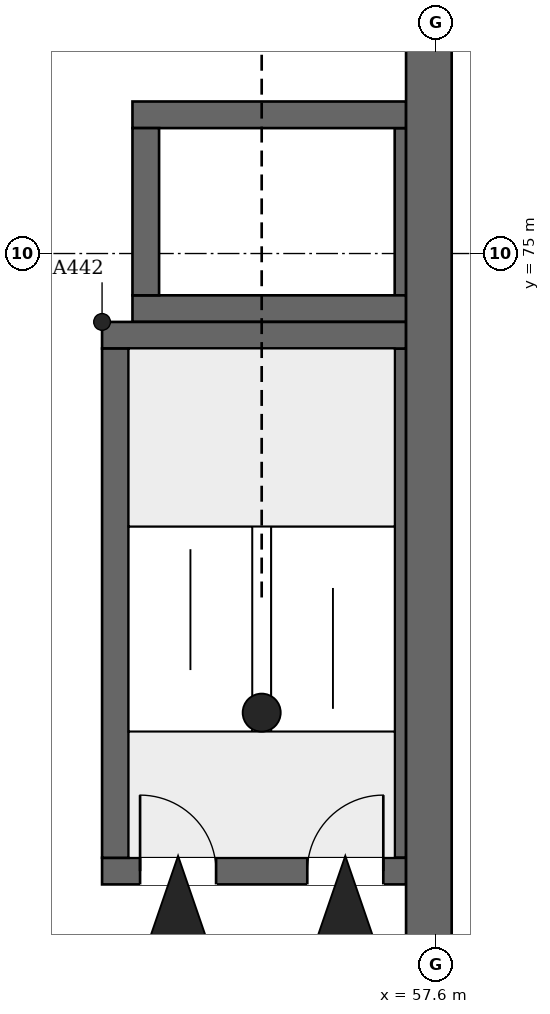
"""IFC4 building model, lengths in metres.
Left out: names, types, materials, properties, quantities, classifications, styles, units other than length and angle.
Written with IfcOpenShell. Run it as: python <this file> out.ifc"""

import sys

from ifc_helpers import new_model, si_unit, direction, frame, frame_2d, origin, place, context, subcontext, project, spatial, rectangle, extrude, element, fill, save


model = new_model("IFC4")
c1 = context("Model", 3, precision=1e-05, world=origin(), true_north=direction((0.0, 1.0)))
c2 = subcontext(c1, "Body", "Model", "MODEL_VIEW")
j1 = project(units=[si_unit("LENGTHUNIT", "METRE"), si_unit("PLANEANGLEUNIT", "RADIAN")], contexts=[c1])
p1 = place(None, origin())
s1 = spatial("IfcSite", under=j1, at=p1, CompositionType="ELEMENT")
p2 = place(p1, origin())
s2 = spatial("IfcBuilding", under=s1, at=p2, CompositionType="ELEMENT")
p3 = place(p2, frame((0.0, 0.0, -5.5)))
s3 = spatial("IfcBuildingStorey", under=s2, at=p3, CompositionType="ELEMENT", Elevation=-5.5)
p4 = place(p3, frame((57.5, 46.72, 0.0), z_axis=(0.0, 0.0, 1.0), x_axis=(0.0, 1.0, 0.0)))
e1 = element("IfcWall", 1, at=p4, inside=s3, PredefinedType="SOLIDWALL", context=c2, shape_type="SweptSolid", body=[
    extrude(rectangle(XDim=47.36, YDim=0.6, at=frame_2d((23.68, 0.0))), origin(), (0.0, 0.0, 1.0), 5.5),
])
p5 = place(p3, frame((53.2, 66.875, 0.0), z_axis=(0.0, 0.0, 1.0), x_axis=(1.0, 0.0, 0.0)))
e2 = element("IfcWall", 2, at=p5, inside=s3, PredefinedType="SHEAR", context=c2, shape_type="SweptSolid", body=[
    extrude(rectangle(XDim=4.0, YDim=0.35, at=frame_2d((2.0, 0.0))), origin(), (0.0, 0.0, 1.0), 5.5),
])
p6 = place(p5, frame((0.5, 0.0, 0.0)))
e3 = element("IfcOpeningElement", 3, at=p6, cuts=e2, PredefinedType="OPENING", context=c2, shape_type="SweptSolid", body=[
    extrude(rectangle(XDim=1.0, YDim=2.1, at=frame_2d((0.5, 1.05))), frame((0.0, 0.185, 0.0), z_axis=(0.0, -1.0, 0.0), x_axis=(1.0, 0.0, 0.0)), (0.0, 0.0, 1.0), 0.37),
])
p7 = place(p5, frame((2.7, 0.0, 0.0)))
e4 = element("IfcOpeningElement", 4, at=p7, cuts=e2, PredefinedType="OPENING", context=c2, shape_type="SweptSolid", body=[
    extrude(rectangle(XDim=1.0, YDim=2.1, at=frame_2d((0.5, 1.05))), frame((0.0, 0.185, 0.0), z_axis=(0.0, -1.0, 0.0), x_axis=(1.0, 0.0, 0.0)), (0.0, 0.0, 1.0), 0.37),
])
p8 = place(p3, frame((53.2, 73.925, 0.0), z_axis=(0.0, 0.0, 1.0), x_axis=(1.0, 0.0, 0.0)))
e5 = element("IfcWall", 5, at=p8, inside=s3, PredefinedType="SHEAR", context=c2, shape_type="SweptSolid", body=[
    extrude(rectangle(XDim=4.0, YDim=0.35, at=frame_2d((2.0, 0.0))), origin(), (0.0, 0.0, 1.0), 5.5),
])
p9 = place(p3, frame((53.375, 67.05, 0.0), z_axis=(0.0, 0.0, 1.0), x_axis=(0.0, 1.0, 0.0)))
e6 = element("IfcWall", 6, at=p9, inside=s3, PredefinedType="SHEAR", context=c2, shape_type="SweptSolid", body=[
    extrude(rectangle(XDim=6.7, YDim=0.35, at=frame_2d((3.35, 0.0))), origin(), (0.0, 0.0, 1.0), 5.5),
])
p10 = place(p3, frame((57.125, 67.05, 0.0), z_axis=(0.0, 0.0, 1.0), x_axis=(0.0, 1.0, 0.0)))
e7 = element("IfcWall", 7, at=p10, inside=s3, PredefinedType="SHEAR", context=c2, shape_type="SweptSolid", body=[
    extrude(rectangle(XDim=6.7, YDim=0.15, at=frame_2d((3.35, 0.0))), origin(), (0.0, 0.0, 1.0), 5.5),
])
for number, where, z_axis, x_axis in (
    (8, (53.6, 74.275, 0.0), (0.0, 0.0, 1.0), (1.0, 0.0, 0.0)),
    (9, (53.6, 76.825, 0.0), (0.0, 0.0, 1.0), (1.0, 0.0, 0.0)),
):
    element("IfcWall", number, at=place(p3, frame(where, z_axis=z_axis, x_axis=x_axis)), inside=s3, PredefinedType="SHEAR", context=c2, shape_type="SweptSolid", body=[
        extrude(rectangle(XDim=3.6, YDim=0.35, at=frame_2d((1.8, 0.0))), origin(), (0.0, 0.0, 1.0), 5.5),
    ])
p11 = place(p3, frame((53.775, 74.45, 0.0), z_axis=(0.0, 0.0, 1.0), x_axis=(0.0, 1.0, 0.0)))
e10 = element("IfcWall", 10, at=p11, inside=s3, PredefinedType="SHEAR", context=c2, shape_type="SweptSolid", body=[
    extrude(rectangle(XDim=2.2, YDim=0.35, at=frame_2d((1.1, 0.0))), origin(), (0.0, 0.0, 1.0), 5.5),
])
p12 = place(p3, frame((57.125, 74.45, 0.0), z_axis=(0.0, 0.0, 1.0), x_axis=(0.0, 1.0, 0.0)))
e11 = element("IfcWall", 11, at=p12, inside=s3, PredefinedType="SHEAR", context=c2, shape_type="SweptSolid", body=[
    extrude(rectangle(XDim=2.2, YDim=0.15, at=frame_2d((1.1, 0.0))), origin(), (0.0, 0.0, 1.0), 5.5),
])
p13 = place(p6, origin())
e12 = element("IfcDoor", 12, at=p13, inside=s3, OperationType="SINGLE_SWING_RIGHT", PredefinedType="DOOR", context=c2, shape_type="SweptSolid", body=[
    extrude(rectangle(XDim=1.0, YDim=2.1, at=frame_2d((0.5, 1.05))), frame((0.0, 0.025, 0.0), z_axis=(0.0, -1.0, 0.0), x_axis=(1.0, 0.0, 0.0)), (0.0, 0.0, 1.0), 0.05),
])
fill(e3, e12)
p14 = place(p7, origin())
e13 = element("IfcDoor", 13, at=p14, inside=s3, OperationType="SINGLE_SWING_LEFT", PredefinedType="DOOR", context=c2, shape_type="SweptSolid", body=[
    extrude(rectangle(XDim=1.0, YDim=2.1, at=frame_2d((0.5, 1.05))), frame((0.0, 0.025, 0.0), z_axis=(0.0, -1.0, 0.0), x_axis=(1.0, 0.0, 0.0)), (0.0, 0.0, 1.0), 0.05),
])
fill(e4, e13)
save(model, sys.argv[1])
